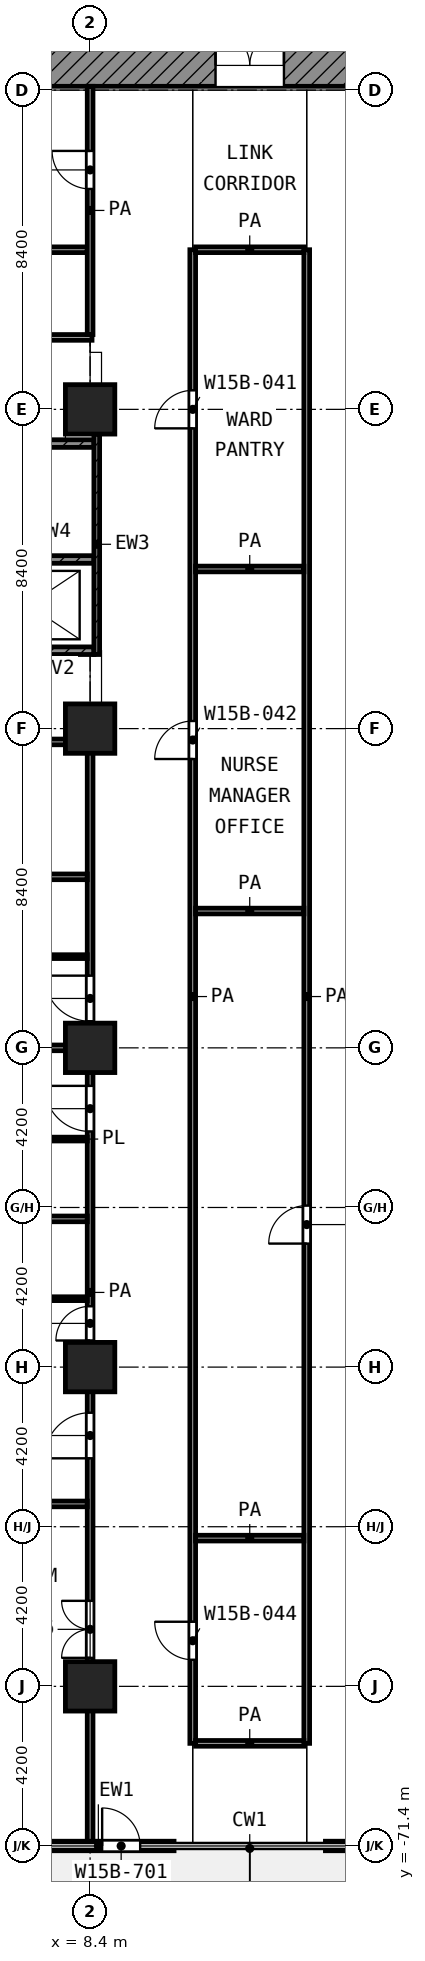
"""IFC4 building model, lengths in metres.
Left out: names, types, materials, properties, quantities, classifications, styles, units other than length and angle.
Written with IfcOpenShell. Run it as: python <this file> out.ifc"""

import sys

from ifc_helpers import new_model, si_unit, direction, frame, frame_2d, origin, origin_2d, place, context, subcontext, project, spatial, rectangle, extrude, element, fill, save


model = new_model("IFC4")
c1 = context("Model", 3, precision=1e-05, world=origin(), true_north=direction((0.0, 1.0)))
c2 = subcontext(c1, "Body", "Model", "MODEL_VIEW")
j1 = project(units=[si_unit("LENGTHUNIT", "METRE"), si_unit("PLANEANGLEUNIT", "RADIAN")], contexts=[c1])
p1 = place(None, origin())
s1 = spatial("IfcSite", under=j1, at=p1, CompositionType="ELEMENT")
p2 = place(p1, origin())
s2 = spatial("IfcBuilding", under=s1, at=p2, CompositionType="ELEMENT")
p3 = place(p2, frame((0.0, 0.0, 85.4)))
s3 = spatial("IfcBuildingStorey", under=s2, at=p3, CompositionType="ELEMENT", Elevation=85.4)
for number, where, z_axis, x_axis in (
    (1, (8.4, -33.6, 0.0), (0.0, 0.0, 1.0), (1.0, 0.0, 0.0)),
    (2, (8.4, -42.0, 0.0), (0.0, 0.0, 1.0), (1.0, 0.0, 0.0)),
    (3, (8.4, -50.4, 0.0), (0.0, 0.0, 1.0), (1.0, 0.0, 0.0)),
    (4, (8.4, -58.8, 0.0), (0.0, 0.0, 1.0), (1.0, 0.0, 0.0)),
    (5, (8.4, -67.2, 0.0), (0.0, 0.0, 1.0), (1.0, 0.0, 0.0)),
):
    element("IfcColumn", number, at=place(p3, frame(where, z_axis=z_axis, x_axis=x_axis)), inside=s3, PredefinedType="COLUMN", context=c2, shape_type="SweptSolid", body=[
        extrude(rectangle(XDim=1.3, YDim=1.3, at=origin_2d()), origin(), (0.0, 0.0, 1.0), 4.2),
    ])
p4 = place(p3, frame((6.625, -71.4, 0.0), z_axis=(0.0, 0.0, 1.0), x_axis=(1.0, 0.0, 0.0)))
e6 = element("IfcWall", 6, at=p4, inside=s3, PredefinedType="SOLIDWALL", context=c2, shape_type="SweptSolid", body=[
    extrude(rectangle(XDim=3.983, YDim=0.25, at=frame_2d((1.992, 0.0))), origin(), (0.0, 0.0, 1.0), 3.78),
])
p5 = place(p4, frame((2.092, 0.0, 0.0)))
e7 = element("IfcOpeningElement", 7, at=p5, cuts=e6, PredefinedType="OPENING", context=c2, shape_type="SweptSolid", body=[
    extrude(rectangle(XDim=1.0, YDim=2.1, at=frame_2d((0.5, 1.05))), frame((0.0, 0.135, 0.0), z_axis=(0.0, -1.0, 0.0), x_axis=(1.0, 0.0, 0.0)), (0.0, 0.0, 1.0), 0.27),
])
p6 = place(p3, frame((14.592, -71.4, 0.0), z_axis=(0.0, 0.0, 1.0), x_axis=(1.0, 0.0, 0.0)))
e8 = element("IfcWall", 8, at=p6, inside=s3, PredefinedType="SOLIDWALL", context=c2, shape_type="SweptSolid", body=[
    extrude(rectangle(XDim=3.983, YDim=0.25, at=frame_2d((1.992, 0.0))), origin(), (0.0, 0.0, 1.0), 3.78),
])
p7 = place(p6, frame((0.892, 0.0, 0.0)))
e9 = element("IfcOpeningElement", 9, at=p7, cuts=e8, PredefinedType="OPENING", context=c2, shape_type="SweptSolid", body=[
    extrude(rectangle(XDim=1.0, YDim=2.1, at=frame_2d((0.5, 1.05))), frame((0.0, 0.135, 0.0), z_axis=(0.0, -1.0, 0.0), x_axis=(1.0, 0.0, 0.0)), (0.0, 0.0, 1.0), 0.27),
])
p8 = place(p3, frame((5.4, -24.55, 0.0), z_axis=(0.0, 0.0, 1.0), x_axis=(1.0, 0.0, 0.0)))
e10 = element("IfcWall", 10, at=p8, inside=s3, PredefinedType="SHEAR", context=c2, shape_type="SweptSolid", body=[
    extrude(rectangle(XDim=18.6, YDim=1.1, at=frame_2d((9.3, 0.0))), origin(), (0.0, 0.0, 1.0), 3.9),
])
p9 = place(p8, frame((6.3, 0.0, 0.0)))
e11 = element("IfcOpeningElement", 11, at=p9, cuts=e10, PredefinedType="OPENING", context=c2, shape_type="SweptSolid", body=[
    extrude(rectangle(XDim=1.8, YDim=2.1, at=frame_2d((0.9, 1.05))), frame((0.0, 0.56, 0.0), z_axis=(0.0, -1.0, 0.0), x_axis=(1.0, 0.0, 0.0)), (0.0, 0.0, 1.0), 1.12),
])
p10 = place(p3, frame((8.575, -40.05, 0.0), z_axis=(0.0, 0.0, 1.0), x_axis=(0.0, 1.0, 0.0)))
e12 = element("IfcWall", 12, at=p10, inside=s3, PredefinedType="SHEAR", context=c2, shape_type="SweptSolid", body=[
    extrude(rectangle(XDim=5.8, YDim=0.15, at=frame_2d((2.9, 0.0))), origin(), (0.0, 0.0, 1.0), 3.9),
])
p11 = place(p3, frame((0.45, -34.5, 0.0), z_axis=(0.0, 0.0, 1.0), x_axis=(1.0, 0.0, 0.0)))
e13 = element("IfcWall", 13, at=p11, inside=s3, PredefinedType="SHEAR", context=c2, shape_type="SweptSolid", body=[
    extrude(rectangle(XDim=8.05, YDim=0.2, at=frame_2d((4.025, 0.0))), origin(), (0.0, 0.0, 1.0), 3.9),
])
p12 = place(p11, frame((0.75, 0.0, 0.0)))
e14 = element("IfcOpeningElement", 14, at=p12, cuts=e13, PredefinedType="OPENING", context=c2, shape_type="SweptSolid", body=[
    extrude(rectangle(XDim=1.1, YDim=2.1, at=frame_2d((0.55, 1.05))), frame((0.0, 0.11, 0.0), z_axis=(0.0, -1.0, 0.0), x_axis=(1.0, 0.0, 0.0)), (0.0, 0.0, 1.0), 0.22),
])
p13 = place(p3, frame((0.45, -37.55, 0.0), z_axis=(0.0, 0.0, 1.0), x_axis=(1.0, 0.0, 0.0)))
e15 = element("IfcWall", 15, at=p13, inside=s3, PredefinedType="SHEAR", context=c2, shape_type="SweptSolid", body=[
    extrude(rectangle(XDim=8.05, YDim=0.2, at=frame_2d((4.025, 0.0))), origin(), (0.0, 0.0, 1.0), 3.9),
])
p14 = place(p13, frame((0.1, 0.0, 0.0)))
e16 = element("IfcOpeningElement", 16, at=p14, cuts=e15, PredefinedType="OPENING", context=c2, shape_type="SweptSolid", body=[
    extrude(rectangle(XDim=1.1, YDim=2.1, at=frame_2d((0.55, 1.05))), frame((0.0, 0.11, 0.0), z_axis=(0.0, -1.0, 0.0), x_axis=(1.0, 0.0, 0.0)), (0.0, 0.0, 1.0), 0.22),
])
p15 = place(p3, frame((0.45, -39.95, 0.0), z_axis=(0.0, 0.0, 1.0), x_axis=(1.0, 0.0, 0.0)))
e17 = element("IfcWall", 17, at=p15, inside=s3, PredefinedType="SHEAR", context=c2, shape_type="SweptSolid", body=[
    extrude(rectangle(XDim=8.05, YDim=0.2, at=frame_2d((4.025, 0.0))), origin(), (0.0, 0.0, 1.0), 3.9),
])
p16 = place(p15, frame((2.0, 0.0, 0.0)))
e18 = element("IfcOpeningElement", 18, at=p16, cuts=e17, PredefinedType="OPENING", context=c2, shape_type="SweptSolid", body=[
    extrude(rectangle(XDim=1.1, YDim=2.1, at=frame_2d((0.55, 1.05))), frame((0.0, 0.11, 0.0), z_axis=(0.0, -1.0, 0.0), x_axis=(1.0, 0.0, 0.0)), (0.0, 0.0, 1.0), 0.22),
])
p17 = place(p3, frame((5.751, -57.0, 0.0), z_axis=(0.0, 0.0, 1.0), x_axis=(1.0, 0.0, 0.0)))
e19 = element("IfcWall", 19, at=p17, inside=s3, PredefinedType="PARTITIONING", context=c2, shape_type="SweptSolid", body=[
    extrude(rectangle(XDim=2.574, YDim=0.1, at=frame_2d((1.287, 0.0))), origin(), (0.0, 0.0, 1.0), 3.9),
])
for number, where, z_axis, x_axis in (
    (20, (5.75, -52.8, 0.0), (0.0, 0.0, 1.0), (1.0, 0.0, 0.0)),
    (21, (5.75, -48.0, 0.0), (0.0, 0.0, 1.0), (1.0, 0.0, 0.0)),
):
    element("IfcWall", number, at=place(p3, frame(where, z_axis=z_axis, x_axis=x_axis)), inside=s3, PredefinedType="PARTITIONING", context=c2, shape_type="SweptSolid", body=[
        extrude(rectangle(XDim=2.575, YDim=0.1, at=frame_2d((1.288, 0.0))), origin(), (0.0, 0.0, 1.0), 3.9),
    ])
for number, where, z_axis, x_axis in (
    (22, (11.175, -68.7, 0.0), (0.0, 0.0, 1.0), (1.0, 0.0, 0.0)),
    (23, (11.175, -63.3, 0.0), (0.0, 0.0, 1.0), (1.0, 0.0, 0.0)),
):
    element("IfcWall", number, at=place(p3, frame(where, z_axis=z_axis, x_axis=x_axis)), inside=s3, PredefinedType="PARTITIONING", context=c2, shape_type="SweptSolid", body=[
        extrude(rectangle(XDim=2.85, YDim=0.15, at=frame_2d((1.425, 0.0))), origin(), (0.0, 0.0, 1.0), 3.9),
    ])
for number, where, z_axis, x_axis in (
    (24, (0.08, -62.4, 0.0), (0.0, 0.0, 1.0), (1.0, 0.0, 0.0)),
    (25, (0.08, -54.9, 0.0), (0.0, 0.0, 1.0), (1.0, 0.0, 0.0)),
    (26, (0.08, -50.4, 0.0), (0.0, 0.0, 1.0), (1.0, 0.0, 0.0)),
):
    element("IfcWall", number, at=place(p3, frame(where, z_axis=z_axis, x_axis=x_axis)), inside=s3, PredefinedType="PARTITIONING", context=c2, shape_type="SweptSolid", body=[
        extrude(rectangle(XDim=8.245, YDim=0.15, at=frame_2d((4.123, 0.0))), origin(), (0.0, 0.0, 1.0), 3.9),
    ])
p18 = place(p3, frame((11.175, -46.8, 0.0), z_axis=(0.0, 0.0, 1.0), x_axis=(1.0, 0.0, 0.0)))
e27 = element("IfcWall", 27, at=p18, inside=s3, PredefinedType="PARTITIONING", context=c2, shape_type="SweptSolid", body=[
    extrude(rectangle(XDim=2.85, YDim=0.15, at=frame_2d((1.425, 0.0))), origin(), (0.0, 0.0, 1.0), 3.9),
])
p19 = place(p3, frame((0.08, -45.9, 0.0), z_axis=(0.0, 0.0, 1.0), x_axis=(1.0, 0.0, 0.0)))
e28 = element("IfcWall", 28, at=p19, inside=s3, PredefinedType="PARTITIONING", context=c2, shape_type="SweptSolid", body=[
    extrude(rectangle(XDim=8.245, YDim=0.15, at=frame_2d((4.123, 0.0))), origin(), (0.0, 0.0, 1.0), 3.9),
])
p20 = place(p3, frame((2.327, -42.35, 0.0), z_axis=(0.0, 0.0, 1.0), x_axis=(1.0, 0.0, 0.0)))
e29 = element("IfcWall", 29, at=p20, inside=s3, PredefinedType="PARTITIONING", context=c2, shape_type="SweptSolid", body=[
    extrude(rectangle(XDim=5.998, YDim=0.15, at=frame_2d((2.999, 0.0))), origin(), (0.0, 0.0, 1.0), 3.9),
])
p21 = place(p20, frame((2.499, 0.0, 0.0)))
e30 = element("IfcOpeningElement", 30, at=p21, cuts=e29, PredefinedType="OPENING", context=c2, shape_type="SweptSolid", body=[
    extrude(rectangle(XDim=1.0, YDim=2.1, at=frame_2d((0.5, 1.05))), frame((0.0, 0.085, 0.0), z_axis=(0.0, -1.0, 0.0), x_axis=(1.0, 0.0, 0.0)), (0.0, 0.0, 1.0), 0.17),
])
p22 = place(p3, frame((11.175, -37.8, 0.0), z_axis=(0.0, 0.0, 1.0), x_axis=(1.0, 0.0, 0.0)))
e31 = element("IfcWall", 31, at=p22, inside=s3, PredefinedType="PARTITIONING", context=c2, shape_type="SweptSolid", body=[
    extrude(rectangle(XDim=2.85, YDim=0.15, at=frame_2d((1.425, 0.0))), origin(), (0.0, 0.0, 1.0), 3.9),
])
p23 = place(p3, frame((1.002, -31.707, 0.0), z_axis=(0.0, 0.0, 1.0), x_axis=(1.0, 0.0, 0.0)))
e32 = element("IfcWall", 32, at=p23, inside=s3, PredefinedType="PARTITIONING", context=c2, shape_type="SweptSolid", body=[
    extrude(rectangle(XDim=7.448, YDim=0.15, at=frame_2d((3.724, 0.0))), origin(), (0.0, 0.0, 1.0), 3.9),
])
p24 = place(p23, frame((3.199, 0.0, 0.0)))
e33 = element("IfcOpeningElement", 33, at=p24, cuts=e32, PredefinedType="OPENING", context=c2, shape_type="SweptSolid", body=[
    extrude(rectangle(XDim=1.0, YDim=2.1, at=frame_2d((0.5, 1.05))), frame((0.0, 0.085, 0.0), z_axis=(0.0, -1.0, 0.0), x_axis=(1.0, 0.0, 0.0)), (0.0, 0.0, 1.0), 0.17),
])
p25 = place(p3, frame((0.08, -29.4, 0.0), z_axis=(0.0, 0.0, 1.0), x_axis=(1.0, 0.0, 0.0)))
e34 = element("IfcWall", 34, at=p25, inside=s3, PredefinedType="PARTITIONING", context=c2, shape_type="SweptSolid", body=[
    extrude(rectangle(XDim=8.245, YDim=0.15, at=frame_2d((4.123, 0.0))), origin(), (0.0, 0.0, 1.0), 3.9),
])
p26 = place(p3, frame((11.175, -29.4, 0.0), z_axis=(0.0, 0.0, 1.0), x_axis=(1.0, 0.0, 0.0)))
e35 = element("IfcWall", 35, at=p26, inside=s3, PredefinedType="PARTITIONING", context=c2, shape_type="SweptSolid", body=[
    extrude(rectangle(XDim=2.85, YDim=0.15, at=frame_2d((1.425, 0.0))), origin(), (0.0, 0.0, 1.0), 3.9),
])
p27 = place(p3, frame((8.4, -71.32, 0.0), z_axis=(0.0, 0.0, 1.0), x_axis=(0.0, 1.0, 0.0)))
e36 = element("IfcWall", 36, at=p27, inside=s3, PredefinedType="PARTITIONING", context=c2, shape_type="SweptSolid", body=[
    extrude(rectangle(XDim=28.97, YDim=0.15, at=frame_2d((14.485, 0.0))), origin(), (0.0, 0.0, 1.0), 3.9),
])
p28 = place(p27, frame((21.62, 0.0, 0.0)))
e37 = element("IfcOpeningElement", 37, at=p28, cuts=e36, PredefinedType="OPENING", context=c2, shape_type="SweptSolid", body=[
    extrude(rectangle(XDim=1.2, YDim=2.1, at=frame_2d((0.6, 1.05))), frame((0.0, 0.085, 0.0), z_axis=(0.0, -1.0, 0.0), x_axis=(1.0, 0.0, 0.0)), (0.0, 0.0, 1.0), 0.17),
])
p29 = place(p27, frame((18.72, 0.0, 0.0)))
e38 = element("IfcOpeningElement", 38, at=p29, cuts=e36, PredefinedType="OPENING", context=c2, shape_type="SweptSolid", body=[
    extrude(rectangle(XDim=1.2, YDim=2.1, at=frame_2d((0.6, 1.05))), frame((0.0, 0.085, 0.0), z_axis=(0.0, -1.0, 0.0), x_axis=(1.0, 0.0, 0.0)), (0.0, 0.0, 1.0), 0.17),
])
p30 = place(p27, frame((10.12, 0.0, 0.0)))
e39 = element("IfcOpeningElement", 39, at=p30, cuts=e36, PredefinedType="OPENING", context=c2, shape_type="SweptSolid", body=[
    extrude(rectangle(XDim=1.2, YDim=2.1, at=frame_2d((0.6, 1.05))), frame((0.0, 0.085, 0.0), z_axis=(0.0, -1.0, 0.0), x_axis=(1.0, 0.0, 0.0)), (0.0, 0.0, 1.0), 0.17),
])
p31 = place(p27, frame((13.22, 0.0, 0.0)))
e40 = element("IfcOpeningElement", 40, at=p31, cuts=e36, PredefinedType="OPENING", context=c2, shape_type="SweptSolid", body=[
    extrude(rectangle(XDim=0.9, YDim=2.1, at=frame_2d((0.45, 1.05))), frame((0.0, 0.085, 0.0), z_axis=(0.0, -1.0, 0.0), x_axis=(1.0, 0.0, 0.0)), (0.0, 0.0, 1.0), 0.17),
])
p32 = place(p27, frame((4.87, 0.0, 0.0)))
e41 = element("IfcOpeningElement", 41, at=p32, cuts=e36, PredefinedType="OPENING", context=c2, shape_type="SweptSolid", body=[
    extrude(rectangle(XDim=1.5, YDim=2.1, at=frame_2d((0.75, 1.05))), frame((0.0, 0.085, 0.0), z_axis=(0.0, -1.0, 0.0), x_axis=(1.0, 0.0, 0.0)), (0.0, 0.0, 1.0), 0.17),
])
p33 = place(p3, frame((8.4, -31.632, 0.0), z_axis=(0.0, 0.0, 1.0), x_axis=(0.0, 1.0, 0.0)))
e42 = element("IfcWall", 42, at=p33, inside=s3, PredefinedType="PARTITIONING", context=c2, shape_type="SweptSolid", body=[
    extrude(rectangle(XDim=6.532, YDim=0.15, at=frame_2d((3.266, 0.0))), origin(), (0.0, 0.0, 1.0), 3.9),
])
p34 = place(p33, frame((3.832, 0.0, 0.0)))
e43 = element("IfcOpeningElement", 43, at=p34, cuts=e42, PredefinedType="OPENING", context=c2, shape_type="SweptSolid", body=[
    extrude(rectangle(XDim=1.0, YDim=2.1, at=frame_2d((0.5, 1.05))), frame((0.0, 0.085, 0.0), z_axis=(0.0, -1.0, 0.0), x_axis=(1.0, 0.0, 0.0)), (0.0, 0.0, 1.0), 0.17),
])
p35 = place(p3, frame((11.1, -68.7, 0.0), z_axis=(0.0, 0.0, 1.0), x_axis=(0.0, 1.0, 0.0)))
e44 = element("IfcWall", 44, at=p35, inside=s3, PredefinedType="PARTITIONING", context=c2, shape_type="SweptSolid", body=[
    extrude(rectangle(XDim=39.3, YDim=0.15, at=frame_2d((19.65, 0.0))), origin(), (0.0, 0.0, 1.0), 3.9),
])
p36 = place(p35, frame((34.6, 0.0, 0.0)))
e45 = element("IfcOpeningElement", 45, at=p36, cuts=e44, PredefinedType="OPENING", context=c2, shape_type="SweptSolid", body=[
    extrude(rectangle(XDim=1.0, YDim=2.1, at=frame_2d((0.5, 1.05))), frame((0.0, 0.085, 0.0), z_axis=(0.0, -1.0, 0.0), x_axis=(1.0, 0.0, 0.0)), (0.0, 0.0, 1.0), 0.17),
])
p37 = place(p35, frame((25.9, 0.0, 0.0)))
e46 = element("IfcOpeningElement", 46, at=p37, cuts=e44, PredefinedType="OPENING", context=c2, shape_type="SweptSolid", body=[
    extrude(rectangle(XDim=1.0, YDim=2.1, at=frame_2d((0.5, 1.05))), frame((0.0, 0.085, 0.0), z_axis=(0.0, -1.0, 0.0), x_axis=(1.0, 0.0, 0.0)), (0.0, 0.0, 1.0), 0.17),
])
p38 = place(p35, frame((2.2, 0.0, 0.0)))
e47 = element("IfcOpeningElement", 47, at=p38, cuts=e44, PredefinedType="OPENING", context=c2, shape_type="SweptSolid", body=[
    extrude(rectangle(XDim=1.0, YDim=2.1, at=frame_2d((0.5, 1.05))), frame((0.0, 0.085, 0.0), z_axis=(0.0, -1.0, 0.0), x_axis=(1.0, 0.0, 0.0)), (0.0, 0.0, 1.0), 0.17),
])
p39 = place(p3, frame((14.1, -68.7, 0.0), z_axis=(0.0, 0.0, 1.0), x_axis=(0.0, 1.0, 0.0)))
e48 = element("IfcWall", 48, at=p39, inside=s3, PredefinedType="PARTITIONING", context=c2, shape_type="SweptSolid", body=[
    extrude(rectangle(XDim=39.3, YDim=0.15, at=frame_2d((19.65, 0.0))), origin(), (0.0, 0.0, 1.0), 3.9),
])
p40 = place(p39, frame((13.15, 0.0, 0.0)))
e49 = element("IfcOpeningElement", 49, at=p40, cuts=e48, PredefinedType="OPENING", context=c2, shape_type="SweptSolid", body=[
    extrude(rectangle(XDim=1.0, YDim=2.1, at=frame_2d((0.5, 1.05))), frame((0.0, 0.085, 0.0), z_axis=(0.0, -1.0, 0.0), x_axis=(1.0, 0.0, 0.0)), (0.0, 0.0, 1.0), 0.17),
])
p41 = place(p5, origin())
e50 = element("IfcDoor", 50, at=p41, inside=s3, OperationType="SINGLE_SWING_LEFT", PredefinedType="DOOR", context=c2, shape_type="SweptSolid", body=[
    extrude(rectangle(XDim=1.0, YDim=2.1, at=frame_2d((0.5, 1.05))), frame((0.0, 0.025, 0.0), z_axis=(0.0, -1.0, 0.0), x_axis=(1.0, 0.0, 0.0)), (0.0, 0.0, 1.0), 0.05),
])
fill(e7, e50)
p42 = place(p9, origin())
e51 = element("IfcDoor", 51, at=p42, inside=s3, OperationType="DOUBLE_DOOR_SINGLE_SWING", PredefinedType="DOOR", context=c2, shape_type="SweptSolid", body=[
    extrude(rectangle(XDim=1.8, YDim=2.1, at=frame_2d((0.9, 1.05))), frame((0.0, 0.025, 0.0), z_axis=(0.0, -1.0, 0.0), x_axis=(1.0, 0.0, 0.0)), (0.0, 0.0, 1.0), 0.05),
])
fill(e11, e51)
p43 = place(p34, origin())
e52 = element("IfcDoor", 52, at=p43, inside=s3, OperationType="SINGLE_SWING_RIGHT", PredefinedType="DOOR", context=c2, shape_type="SweptSolid", body=[
    extrude(rectangle(XDim=1.0, YDim=2.1, at=frame_2d((0.5, 1.05))), frame((0.0, 0.025, 0.0), z_axis=(0.0, -1.0, 0.0), x_axis=(1.0, 0.0, 0.0)), (0.0, 0.0, 1.0), 0.05),
])
fill(e43, e52)
p44 = place(p28, origin())
e53 = element("IfcDoor", 53, at=p44, inside=s3, OperationType="SINGLE_SWING_RIGHT", PredefinedType="DOOR", context=c2, shape_type="SweptSolid", body=[
    extrude(rectangle(XDim=1.2, YDim=2.1, at=frame_2d((0.6, 1.05))), frame((0.0, 0.025, 0.0), z_axis=(0.0, -1.0, 0.0), x_axis=(1.0, 0.0, 0.0)), (0.0, 0.0, 1.0), 0.05),
])
fill(e37, e53)
p45 = place(p29, origin())
e54 = element("IfcDoor", 54, at=p45, inside=s3, OperationType="SINGLE_SWING_RIGHT", PredefinedType="DOOR", context=c2, shape_type="SweptSolid", body=[
    extrude(rectangle(XDim=1.2, YDim=2.1, at=frame_2d((0.6, 1.05))), frame((0.0, 0.025, 0.0), z_axis=(0.0, -1.0, 0.0), x_axis=(1.0, 0.0, 0.0)), (0.0, 0.0, 1.0), 0.05),
])
fill(e38, e54)
p46 = place(p30, origin())
e55 = element("IfcDoor", 55, at=p46, inside=s3, OperationType="SINGLE_SWING_LEFT", PredefinedType="DOOR", context=c2, shape_type="SweptSolid", body=[
    extrude(rectangle(XDim=1.2, YDim=2.1, at=frame_2d((0.6, 1.05))), frame((0.0, 0.025, 0.0), z_axis=(0.0, -1.0, 0.0), x_axis=(1.0, 0.0, 0.0)), (0.0, 0.0, 1.0), 0.05),
])
fill(e39, e55)
p47 = place(p31, origin())
e56 = element("IfcDoor", 56, at=p47, inside=s3, OperationType="SINGLE_SWING_LEFT", PredefinedType="DOOR", context=c2, shape_type="SweptSolid", body=[
    extrude(rectangle(XDim=0.9, YDim=2.1, at=frame_2d((0.45, 1.05))), frame((0.0, 0.025, 0.0), z_axis=(0.0, -1.0, 0.0), x_axis=(1.0, 0.0, 0.0)), (0.0, 0.0, 1.0), 0.05),
])
fill(e40, e56)
p48 = place(p32, origin())
e57 = element("IfcDoor", 57, at=p48, inside=s3, OperationType="DOUBLE_DOOR_SINGLE_SWING", PredefinedType="DOOR", context=c2, shape_type="SweptSolid", body=[
    extrude(rectangle(XDim=1.5, YDim=2.1, at=frame_2d((0.75, 1.05))), frame((0.0, 0.025, 0.0), z_axis=(0.0, -1.0, 0.0), x_axis=(1.0, 0.0, 0.0)), (0.0, 0.0, 1.0), 0.05),
])
fill(e41, e57)
p49 = place(p36, origin())
e58 = element("IfcDoor", 58, at=p49, inside=s3, OperationType="SINGLE_SWING_LEFT", PredefinedType="DOOR", context=c2, shape_type="SweptSolid", body=[
    extrude(rectangle(XDim=1.0, YDim=2.1, at=frame_2d((0.5, 1.05))), frame((0.0, 0.025, 0.0), z_axis=(0.0, -1.0, 0.0), x_axis=(1.0, 0.0, 0.0)), (0.0, 0.0, 1.0), 0.05),
])
fill(e45, e58)
p50 = place(p37, origin())
e59 = element("IfcDoor", 59, at=p50, inside=s3, OperationType="SINGLE_SWING_LEFT", PredefinedType="DOOR", context=c2, shape_type="SweptSolid", body=[
    extrude(rectangle(XDim=1.0, YDim=2.1, at=frame_2d((0.5, 1.05))), frame((0.0, 0.025, 0.0), z_axis=(0.0, -1.0, 0.0), x_axis=(1.0, 0.0, 0.0)), (0.0, 0.0, 1.0), 0.05),
])
fill(e46, e59)
p51 = place(p40, origin())
e60 = element("IfcDoor", 60, at=p51, inside=s3, OperationType="SINGLE_SWING_LEFT", PredefinedType="DOOR", context=c2, shape_type="SweptSolid", body=[
    extrude(rectangle(XDim=1.0, YDim=2.1, at=frame_2d((0.5, 1.05))), frame((0.0, 0.025, 0.0), z_axis=(0.0, -1.0, 0.0), x_axis=(1.0, 0.0, 0.0)), (0.0, 0.0, 1.0), 0.05),
])
fill(e49, e60)
p52 = place(p38, origin())
e61 = element("IfcDoor", 61, at=p52, inside=s3, OperationType="SINGLE_SWING_RIGHT", PredefinedType="DOOR", context=c2, shape_type="SweptSolid", body=[
    extrude(rectangle(XDim=1.0, YDim=2.1, at=frame_2d((0.5, 1.05))), frame((0.0, 0.025, 0.0), z_axis=(0.0, -1.0, 0.0), x_axis=(1.0, 0.0, 0.0)), (0.0, 0.0, 1.0), 0.05),
])
fill(e47, e61)
save(model, sys.argv[1])
